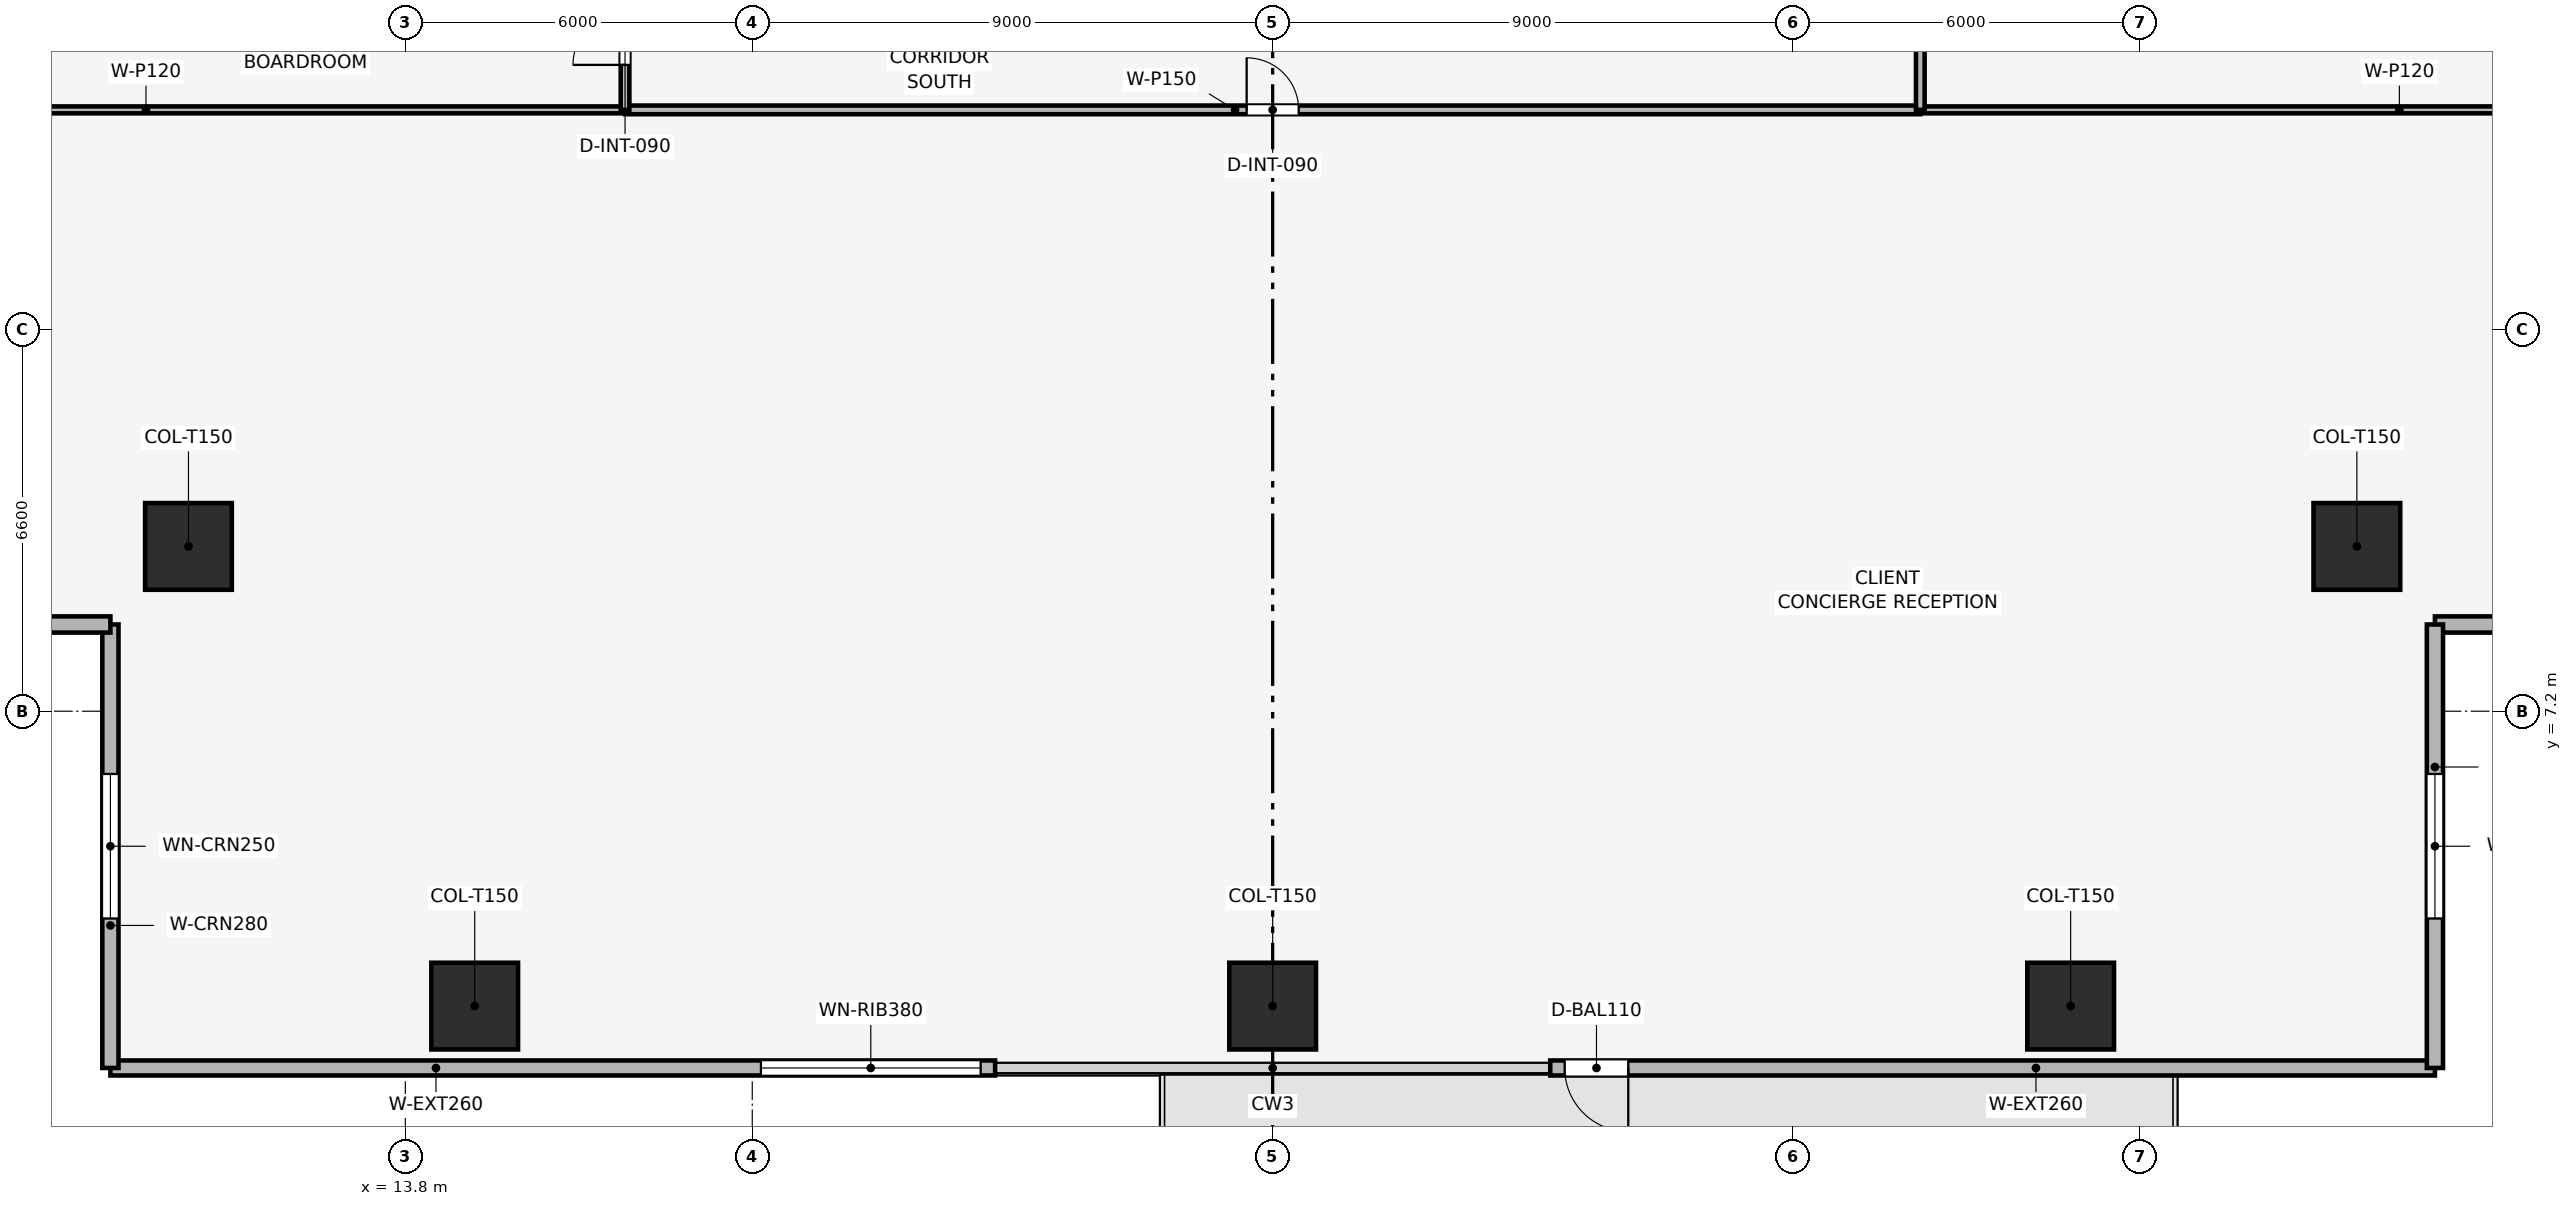
"""IFC4 building model, lengths in metres.
Left out: names, types, materials, properties, quantities, classifications, styles, units other than length and angle.
Written with IfcOpenShell. Run it as: python <this file> out.ifc"""

import sys

from ifc_helpers import new_model, si_unit, direction, frame, frame_2d, origin, origin_2d, place, context, subcontext, project, spatial, rectangle, extrude, element, fill, save


model = new_model("IFC4")
c1 = context("Model", 3, precision=1e-05, world=origin(), true_north=direction((0.0, 1.0)))
c2 = subcontext(c1, "Body", "Model", "MODEL_VIEW")
j1 = project(units=[si_unit("LENGTHUNIT", "METRE"), si_unit("PLANEANGLEUNIT", "RADIAN")], contexts=[c1])
p1 = place(None, origin())
s1 = spatial("IfcSite", under=j1, at=p1, CompositionType="ELEMENT")
p2 = place(p1, origin())
s2 = spatial("IfcBuilding", under=s1, at=p2, CompositionType="ELEMENT")
p3 = place(p2, frame((0.0, 0.0, 72.9)))
s3 = spatial("IfcBuildingStorey", under=s2, at=p3, CompositionType="ELEMENT", Elevation=72.9)
for number, where, z_axis, x_axis in (
    (1, (15.0, 2.1, 0.003), (0.0, 0.0, 1.0), (1.0, 0.0, 0.0)),
    (2, (28.8, 2.1, 0.003), (0.0, 0.0, 1.0), (1.0, 0.0, 0.0)),
    (3, (42.6, 2.1, 0.003), (0.0, 0.0, 1.0), (1.0, 0.0, 0.0)),
    (4, (10.05, 10.05, 0.003), (0.0, 0.0, 1.0), (1.0, 0.0, 0.0)),
    (5, (47.55, 10.05, 0.003), (0.0, 0.0, 1.0), (1.0, 0.0, 0.0)),
):
    element("IfcColumn", number, at=place(p3, frame(where, z_axis=z_axis, x_axis=x_axis)), inside=s3, PredefinedType="COLUMN", context=c2, shape_type="SweptSolid", body=[
        extrude(rectangle(XDim=1.5, YDim=1.5, at=origin_2d()), origin(), (0.0, 0.0, 1.0), 3.644),
    ])
p4 = place(p3, frame((48.9, 1.03, 0.0), z_axis=(0.0, 0.0, 1.0), x_axis=(-1.0, 0.0, 0.0)))
e6 = element("IfcWall", 6, at=p4, inside=s3, PredefinedType="SOLIDWALL", context=c2, shape_type="SweptSolid", body=[
    extrude(rectangle(XDim=15.3, YDim=0.26, at=frame_2d((7.65, 0.0))), origin(), (0.0, 0.0, 1.0), 3.65),
])
p5 = place(p4, frame((13.95, 0.0, 0.0)))
e7 = element("IfcOpeningElement", 7, at=p5, cuts=e6, PredefinedType="OPENING", context=c2, shape_type="SweptSolid", body=[
    extrude(rectangle(XDim=1.1, YDim=2.2, at=frame_2d((0.55, 1.1))), frame((0.0, 0.14, 0.0), z_axis=(0.0, -1.0, 0.0), x_axis=(1.0, 0.0, 0.0)), (0.0, 0.0, 1.0), 0.28),
])
p6 = place(p3, frame((24.0, 1.03, 0.0), z_axis=(0.0, 0.0, 1.0), x_axis=(-1.0, 0.0, 0.0)))
e8 = element("IfcWall", 8, at=p6, inside=s3, PredefinedType="SOLIDWALL", context=c2, shape_type="SweptSolid", body=[
    extrude(rectangle(XDim=15.3, YDim=0.26, at=frame_2d((7.65, 0.0))), origin(), (0.0, 0.0, 1.0), 3.65),
])
p7 = place(p6, frame((0.25, 0.0, 0.9)))
e9 = element("IfcOpeningElement", 9, at=p7, cuts=e8, PredefinedType="OPENING", context=c2, shape_type="SweptSolid", body=[
    extrude(rectangle(XDim=3.8, YDim=1.9, at=frame_2d((1.9, 0.95))), frame((0.0, 0.14, 0.0), z_axis=(0.0, -1.0, 0.0), x_axis=(1.0, 0.0, 0.0)), (0.0, 0.0, 1.0), 0.28),
])
p8 = place(p3, frame((8.7, 1.03, 0.0), z_axis=(0.0, 0.0, 1.0), x_axis=(0.0, 1.0, 0.0)))
e10 = element("IfcWall", 10, at=p8, inside=s3, PredefinedType="SOLIDWALL", context=c2, shape_type="SweptSolid", body=[
    extrude(rectangle(XDim=7.67, YDim=0.28, at=frame_2d((3.835, 0.0))), origin(), (0.0, 0.0, 1.0), 3.65),
])
p9 = place(p8, frame((2.585, 0.0, 0.9)))
e11 = element("IfcOpeningElement", 11, at=p9, cuts=e10, PredefinedType="OPENING", context=c2, shape_type="SweptSolid", body=[
    extrude(rectangle(XDim=2.5, YDim=1.9, at=frame_2d((1.25, 0.95))), frame((0.0, 0.15, 0.0), z_axis=(0.0, -1.0, 0.0), x_axis=(1.0, 0.0, 0.0)), (0.0, 0.0, 1.0), 0.3),
])
p10 = place(p3, frame((8.7, 8.7, 0.0), z_axis=(0.0, 0.0, 1.0), x_axis=(-1.0, 0.0, 0.0)))
e12 = element("IfcWall", 12, at=p10, inside=s3, PredefinedType="SOLIDWALL", context=c2, shape_type="SweptSolid", body=[
    extrude(rectangle(XDim=7.67, YDim=0.28, at=frame_2d((3.835, 0.0))), origin(), (0.0, 0.0, 1.0), 3.65),
])
p11 = place(p10, frame((2.585, 0.0, 0.9)))
e13 = element("IfcOpeningElement", 13, at=p11, cuts=e12, PredefinedType="OPENING", context=c2, shape_type="SweptSolid", body=[
    extrude(rectangle(XDim=2.5, YDim=1.9, at=frame_2d((1.25, 0.95))), frame((0.0, 0.15, 0.0), z_axis=(0.0, -1.0, 0.0), x_axis=(1.0, 0.0, 0.0)), (0.0, 0.0, 1.0), 0.3),
])
p12 = place(p3, frame((56.57, 8.7, 0.0), z_axis=(0.0, 0.0, 1.0), x_axis=(-1.0, 0.0, 0.0)))
e14 = element("IfcWall", 14, at=p12, inside=s3, PredefinedType="SOLIDWALL", context=c2, shape_type="SweptSolid", body=[
    extrude(rectangle(XDim=7.67, YDim=0.28, at=frame_2d((3.835, 0.0))), origin(), (0.0, 0.0, 1.0), 3.65),
])
p13 = place(p12, frame((2.585, 0.0, 0.9)))
e15 = element("IfcOpeningElement", 15, at=p13, cuts=e14, PredefinedType="OPENING", context=c2, shape_type="SweptSolid", body=[
    extrude(rectangle(XDim=2.5, YDim=1.9, at=frame_2d((1.25, 0.95))), frame((0.0, 0.15, 0.0), z_axis=(0.0, -1.0, 0.0), x_axis=(1.0, 0.0, 0.0)), (0.0, 0.0, 1.0), 0.3),
])
p14 = place(p3, frame((48.9, 8.7, 0.0), z_axis=(0.0, 0.0, 1.0), x_axis=(0.0, -1.0, 0.0)))
e16 = element("IfcWall", 16, at=p14, inside=s3, PredefinedType="SOLIDWALL", context=c2, shape_type="SweptSolid", body=[
    extrude(rectangle(XDim=7.67, YDim=0.28, at=frame_2d((3.835, 0.0))), origin(), (0.0, 0.0, 1.0), 3.65),
])
p15 = place(p14, frame((2.585, 0.0, 0.9)))
e17 = element("IfcOpeningElement", 17, at=p15, cuts=e16, PredefinedType="OPENING", context=c2, shape_type="SweptSolid", body=[
    extrude(rectangle(XDim=2.5, YDim=1.9, at=frame_2d((1.25, 0.95))), frame((0.0, 0.15, 0.0), z_axis=(0.0, -1.0, 0.0), x_axis=(1.0, 0.0, 0.0)), (0.0, 0.0, 1.0), 0.3),
])
for number, where, z_axis, x_axis in (
    (18, (1.03, 17.6, 0.0), (0.0, 0.0, 1.0), (1.0, 0.0, 0.0)),
    (19, (40.0, 17.6, 0.0), (0.0, 0.0, 1.0), (1.0, 0.0, 0.0)),
):
    element("IfcWall", number, at=place(p3, frame(where, z_axis=z_axis, x_axis=x_axis)), inside=s3, PredefinedType="PARTITIONING", context=c2, shape_type="SweptSolid", body=[
        extrude(rectangle(XDim=16.57, YDim=0.12, at=frame_2d((8.285, 0.0))), origin(), (0.0, 0.0, 1.0), 2.935),
    ])
p16 = place(p3, frame((17.6, 17.6, 0.0), z_axis=(0.0, 0.0, 1.0), x_axis=(1.0, 0.0, 0.0)))
e20 = element("IfcWall", 20, at=p16, inside=s3, PredefinedType="PARTITIONING", context=c2, shape_type="SweptSolid", body=[
    extrude(rectangle(XDim=22.4, YDim=0.15, at=frame_2d((11.2, 0.0))), origin(), (0.0, 0.0, 1.0), 3.085),
])
p17 = place(p16, frame((10.75, 0.0, 0.0)))
e21 = element("IfcOpeningElement", 21, at=p17, cuts=e20, PredefinedType="OPENING", context=c2, shape_type="SweptSolid", body=[
    extrude(rectangle(XDim=0.9, YDim=2.1, at=frame_2d((0.45, 1.05))), frame((0.0, 0.085, 0.0), z_axis=(0.0, -1.0, 0.0), x_axis=(1.0, 0.0, 0.0)), (0.0, 0.0, 1.0), 0.17),
])
p18 = place(p3, frame((17.6, 17.6, 0.0), z_axis=(0.0, 0.0, 1.0), x_axis=(0.0, 1.0, 0.0)))
e22 = element("IfcWall", 22, at=p18, inside=s3, PredefinedType="PARTITIONING", context=c2, shape_type="SweptSolid", body=[
    extrude(rectangle(XDim=22.4, YDim=0.15, at=frame_2d((11.2, 0.0))), origin(), (0.0, 0.0, 1.0), 3.085),
])
p19 = place(p18, frame((0.778, 0.0, 0.0)))
e23 = element("IfcOpeningElement", 23, at=p19, cuts=e22, PredefinedType="OPENING", context=c2, shape_type="SweptSolid", body=[
    extrude(rectangle(XDim=0.9, YDim=2.1, at=frame_2d((0.45, 1.05))), frame((0.0, 0.085, 0.0), z_axis=(0.0, -1.0, 0.0), x_axis=(1.0, 0.0, 0.0)), (0.0, 0.0, 1.0), 0.17),
])
p20 = place(p18, frame((6.372, 0.0, 0.0)))
e24 = element("IfcOpeningElement", 24, at=p20, cuts=e22, PredefinedType="OPENING", context=c2, shape_type="SweptSolid", body=[
    extrude(rectangle(XDim=0.9, YDim=2.1, at=frame_2d((0.45, 1.05))), frame((0.0, 0.085, 0.0), z_axis=(0.0, -1.0, 0.0), x_axis=(1.0, 0.0, 0.0)), (0.0, 0.0, 1.0), 0.17),
])
p21 = place(p18, frame((16.343, 0.0, 0.0)))
e25 = element("IfcOpeningElement", 25, at=p21, cuts=e22, PredefinedType="OPENING", context=c2, shape_type="SweptSolid", body=[
    extrude(rectangle(XDim=0.9, YDim=2.1, at=frame_2d((0.45, 1.05))), frame((0.0, 0.085, 0.0), z_axis=(0.0, -1.0, 0.0), x_axis=(1.0, 0.0, 0.0)), (0.0, 0.0, 1.0), 0.17),
])
p22 = place(p3, frame((40.0, 17.6, 0.0), z_axis=(0.0, 0.0, 1.0), x_axis=(0.0, 1.0, 0.0)))
e26 = element("IfcWall", 26, at=p22, inside=s3, PredefinedType="PARTITIONING", context=c2, shape_type="SweptSolid", body=[
    extrude(rectangle(XDim=22.4, YDim=0.15, at=frame_2d((11.2, 0.0))), origin(), (0.0, 0.0, 1.0), 3.085),
])
p23 = place(p22, frame((1.4, 0.0, 0.0)))
e27 = element("IfcOpeningElement", 27, at=p23, cuts=e26, PredefinedType="OPENING", context=c2, shape_type="SweptSolid", body=[
    extrude(rectangle(XDim=0.9, YDim=2.1, at=frame_2d((0.45, 1.05))), frame((0.0, 0.085, 0.0), z_axis=(0.0, -1.0, 0.0), x_axis=(1.0, 0.0, 0.0)), (0.0, 0.0, 1.0), 0.17),
])
p24 = place(p22, frame((4.65, 0.0, 0.0)))
e28 = element("IfcOpeningElement", 28, at=p24, cuts=e26, PredefinedType="OPENING", context=c2, shape_type="SweptSolid", body=[
    extrude(rectangle(XDim=0.9, YDim=2.1, at=frame_2d((0.45, 1.05))), frame((0.0, 0.085, 0.0), z_axis=(0.0, -1.0, 0.0), x_axis=(1.0, 0.0, 0.0)), (0.0, 0.0, 1.0), 0.17),
])
p25 = place(p22, frame((7.55, 0.0, 0.0)))
e29 = element("IfcOpeningElement", 29, at=p25, cuts=e26, PredefinedType="OPENING", context=c2, shape_type="SweptSolid", body=[
    extrude(rectangle(XDim=0.9, YDim=2.1, at=frame_2d((0.45, 1.05))), frame((0.0, 0.085, 0.0), z_axis=(0.0, -1.0, 0.0), x_axis=(1.0, 0.0, 0.0)), (0.0, 0.0, 1.0), 0.17),
])
p26 = place(p22, frame((10.3, 0.0, 0.0)))
e30 = element("IfcOpeningElement", 30, at=p26, cuts=e26, PredefinedType="OPENING", context=c2, shape_type="SweptSolid", body=[
    extrude(rectangle(XDim=0.95, YDim=2.1, at=frame_2d((0.475, 1.05))), frame((0.0, 0.085, 0.0), z_axis=(0.0, -1.0, 0.0), x_axis=(1.0, 0.0, 0.0)), (0.0, 0.0, 1.0), 0.17),
])
p27 = place(p22, frame((16.8, 0.0, 0.0)))
e31 = element("IfcOpeningElement", 31, at=p27, cuts=e26, PredefinedType="OPENING", context=c2, shape_type="SweptSolid", body=[
    extrude(rectangle(XDim=0.9, YDim=2.1, at=frame_2d((0.45, 1.05))), frame((0.0, 0.085, 0.0), z_axis=(0.0, -1.0, 0.0), x_axis=(1.0, 0.0, 0.0)), (0.0, 0.0, 1.0), 0.17),
])
p28 = place(p5, origin())
e32 = element("IfcDoor", 32, at=p28, inside=s3, OperationType="SINGLE_SWING_LEFT", PredefinedType="DOOR", context=c2, shape_type="SweptSolid", body=[
    extrude(rectangle(XDim=1.1, YDim=2.2, at=frame_2d((0.55, 1.1))), frame((0.0, 0.025, 0.0), z_axis=(0.0, -1.0, 0.0), x_axis=(1.0, 0.0, 0.0)), (0.0, 0.0, 1.0), 0.05),
])
fill(e7, e32)
p29 = place(p7, origin())
e33 = element("IfcWindow", 33, at=p29, inside=s3, PartitioningType="SINGLE_PANEL", PredefinedType="WINDOW", context=c2, shape_type="SweptSolid", body=[
    extrude(rectangle(XDim=3.8, YDim=1.9, at=frame_2d((1.9, 0.95))), frame((0.0, 0.03, 0.0), z_axis=(0.0, -1.0, 0.0), x_axis=(1.0, 0.0, 0.0)), (0.0, 0.0, 1.0), 0.06),
])
fill(e9, e33)
p30 = place(p9, origin())
e34 = element("IfcWindow", 34, at=p30, inside=s3, PartitioningType="SINGLE_PANEL", PredefinedType="WINDOW", context=c2, shape_type="SweptSolid", body=[
    extrude(rectangle(XDim=2.5, YDim=1.9, at=frame_2d((1.25, 0.95))), frame((0.0, 0.03, 0.0), z_axis=(0.0, -1.0, 0.0), x_axis=(1.0, 0.0, 0.0)), (0.0, 0.0, 1.0), 0.06),
])
fill(e11, e34)
p31 = place(p15, origin())
e35 = element("IfcWindow", 35, at=p31, inside=s3, PartitioningType="SINGLE_PANEL", PredefinedType="WINDOW", context=c2, shape_type="SweptSolid", body=[
    extrude(rectangle(XDim=2.5, YDim=1.9, at=frame_2d((1.25, 0.95))), frame((0.0, 0.03, 0.0), z_axis=(0.0, -1.0, 0.0), x_axis=(1.0, 0.0, 0.0)), (0.0, 0.0, 1.0), 0.06),
])
fill(e17, e35)
p32 = place(p17, origin())
e36 = element("IfcDoor", 36, at=p32, inside=s3, OperationType="SINGLE_SWING_LEFT", PredefinedType="DOOR", context=c2, shape_type="SweptSolid", body=[
    extrude(rectangle(XDim=0.9, YDim=2.1, at=frame_2d((0.45, 1.05))), frame((0.0, 0.025, 0.0), z_axis=(0.0, -1.0, 0.0), x_axis=(1.0, 0.0, 0.0)), (0.0, 0.0, 1.0), 0.05),
])
fill(e21, e36)
p33 = place(p19, origin())
e37 = element("IfcDoor", 37, at=p33, inside=s3, OperationType="SINGLE_SWING_LEFT", PredefinedType="DOOR", context=c2, shape_type="SweptSolid", body=[
    extrude(rectangle(XDim=0.9, YDim=2.1, at=frame_2d((0.45, 1.05))), frame((0.0, 0.025, 0.0), z_axis=(0.0, -1.0, 0.0), x_axis=(1.0, 0.0, 0.0)), (0.0, 0.0, 1.0), 0.05),
])
fill(e23, e37)
save(model, sys.argv[1])
